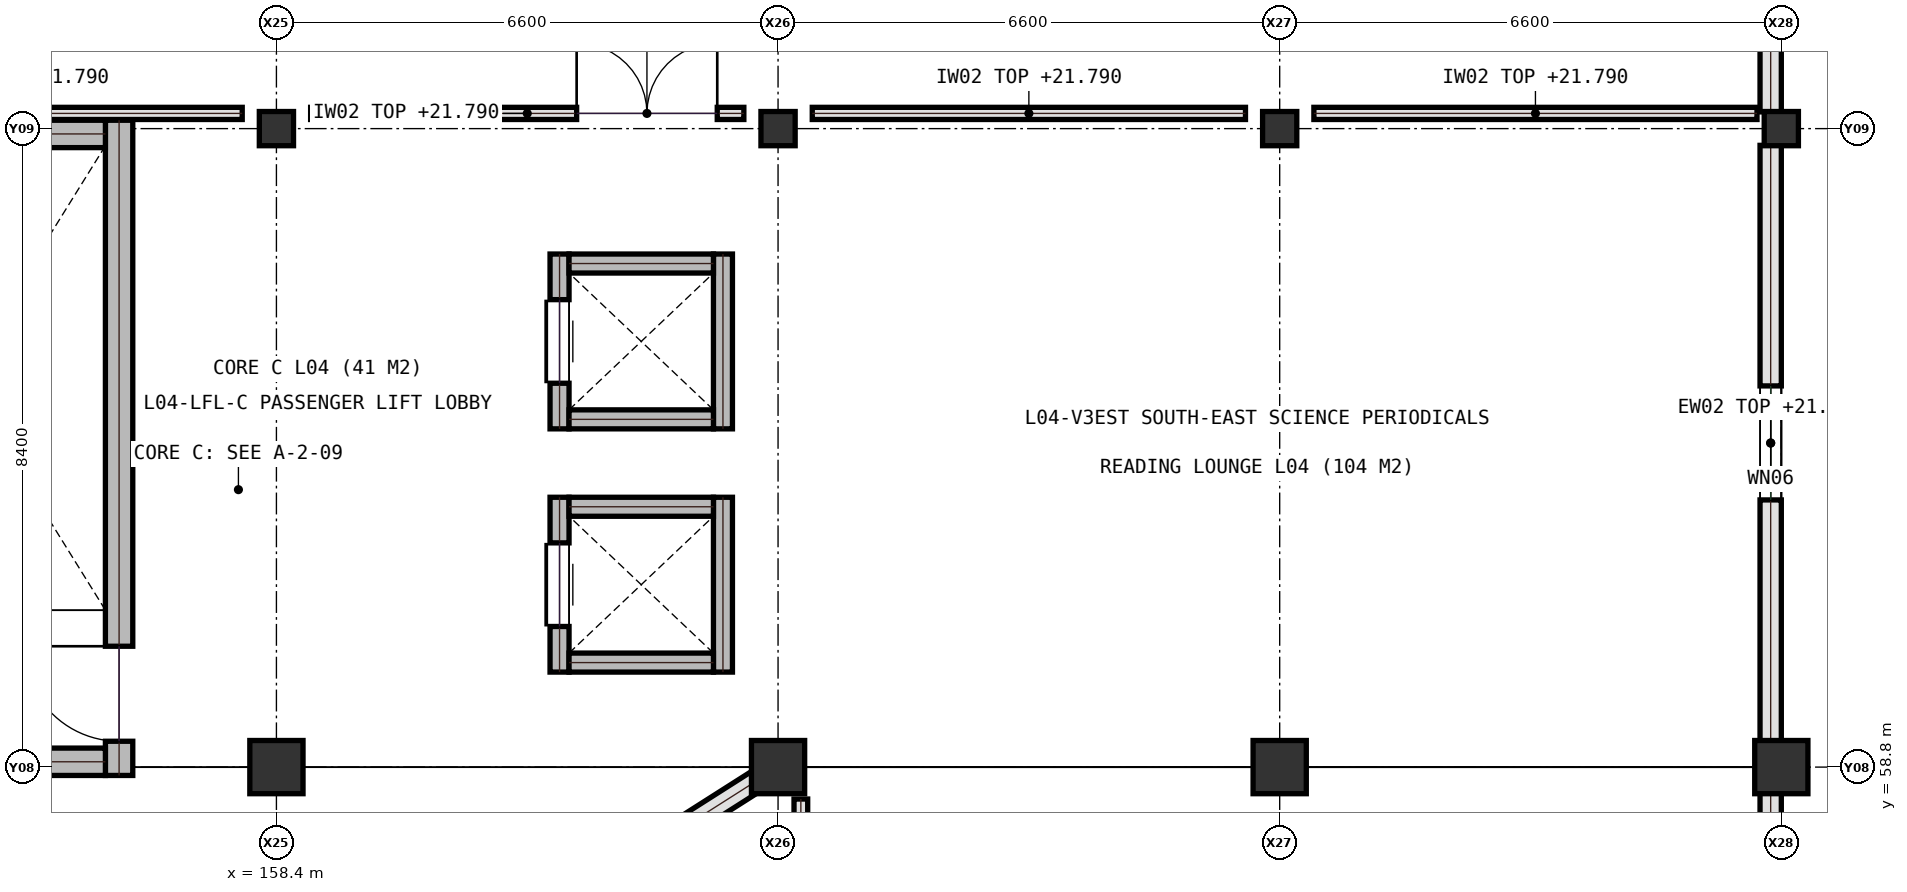
"""IFC4 building model, lengths in metres.
Left out: names, types, materials, properties, quantities, classifications, styles, units other than length and angle.
Written with IfcOpenShell. Run it as: python <this file> out.ifc"""

import sys

from ifc_helpers import new_model, si_unit, direction, frame, frame_2d, origin, origin_2d, place, context, subcontext, project, spatial, rectangle, extrude, element, fill, save


model = new_model("IFC4")
c1 = context("Model", 3, precision=1e-05, world=origin(), true_north=direction((0.0, 1.0)))
c2 = subcontext(c1, "Body", "Model", "MODEL_VIEW")
j1 = project(units=[si_unit("LENGTHUNIT", "METRE"), si_unit("PLANEANGLEUNIT", "RADIAN")], contexts=[c1])
p1 = place(None, origin())
s1 = spatial("IfcSite", under=j1, at=p1, CompositionType="ELEMENT")
p2 = place(p1, origin())
s2 = spatial("IfcBuilding", under=s1, at=p2, CompositionType="ELEMENT")
p3 = place(p2, frame((0.0, 0.0, 18.6)))
s3 = spatial("IfcBuildingStorey", under=s2, at=p3, CompositionType="ELEMENT", Elevation=18.6)
p4 = place(p3, frame((158.4, 58.8, 0.0), z_axis=(0.0, 0.0, 1.0), x_axis=(1.0, 0.0, 0.0)))
e1 = element("IfcColumn", 1, at=p4, inside=s3, PredefinedType="COLUMN", context=c2, shape_type="SweptSolid", body=[
    extrude(rectangle(XDim=0.7, YDim=0.7, at=origin_2d()), origin(), (0.0, 0.0, 1.0), 4.2),
])
p5 = place(p3, frame((158.4, 67.2, 0.0), z_axis=(0.0, 0.0, 1.0), x_axis=(1.0, 0.0, 0.0)))
e2 = element("IfcColumn", 2, at=p5, inside=s3, PredefinedType="COLUMN", context=c2, shape_type="SweptSolid", body=[
    extrude(rectangle(XDim=0.45, YDim=0.45, at=origin_2d()), origin(), (0.0, 0.0, 1.0), 5.495),
])
p6 = place(p3, frame((165.0, 58.8, 0.0), z_axis=(0.0, 0.0, 1.0), x_axis=(1.0, 0.0, 0.0)))
e3 = element("IfcColumn", 3, at=p6, inside=s3, PredefinedType="COLUMN", context=c2, shape_type="SweptSolid", body=[
    extrude(rectangle(XDim=0.7, YDim=0.7, at=origin_2d()), origin(), (0.0, 0.0, 1.0), 4.2),
])
p7 = place(p3, frame((165.0, 67.2, 0.0), z_axis=(0.0, 0.0, 1.0), x_axis=(1.0, 0.0, 0.0)))
e4 = element("IfcColumn", 4, at=p7, inside=s3, PredefinedType="COLUMN", context=c2, shape_type="SweptSolid", body=[
    extrude(rectangle(XDim=0.45, YDim=0.45, at=origin_2d()), origin(), (0.0, 0.0, 1.0), 4.01),
])
p8 = place(p3, frame((171.6, 58.8, 0.0), z_axis=(0.0, 0.0, 1.0), x_axis=(1.0, 0.0, 0.0)))
e5 = element("IfcColumn", 5, at=p8, inside=s3, PredefinedType="COLUMN", context=c2, shape_type="SweptSolid", body=[
    extrude(rectangle(XDim=0.7, YDim=0.7, at=origin_2d()), origin(), (0.0, 0.0, 1.0), 4.2),
])
p9 = place(p3, frame((171.6, 67.2, 0.0), z_axis=(0.0, 0.0, 1.0), x_axis=(1.0, 0.0, 0.0)))
e6 = element("IfcColumn", 6, at=p9, inside=s3, PredefinedType="COLUMN", context=c2, shape_type="SweptSolid", body=[
    extrude(rectangle(XDim=0.45, YDim=0.45, at=origin_2d()), origin(), (0.0, 0.0, 1.0), 5.66),
])
p10 = place(p3, frame((178.2, 58.8, 0.0), z_axis=(0.0, 0.0, 1.0), x_axis=(1.0, 0.0, 0.0)))
e7 = element("IfcColumn", 7, at=p10, inside=s3, PredefinedType="COLUMN", context=c2, shape_type="SweptSolid", body=[
    extrude(rectangle(XDim=0.7, YDim=0.7, at=origin_2d()), origin(), (0.0, 0.0, 1.0), 4.2),
])
p11 = place(p3, frame((178.2, 67.2, 0.0), z_axis=(0.0, 0.0, 1.0), x_axis=(1.0, 0.0, 0.0)))
e8 = element("IfcColumn", 8, at=p11, inside=s3, PredefinedType="COLUMN", context=c2, shape_type="SweptSolid", body=[
    extrude(rectangle(XDim=0.45, YDim=0.45, at=origin_2d()), origin(), (0.0, 0.0, 1.0), 7.31),
])
p12 = place(p3, frame((152.0, 67.4, 0.0), z_axis=(0.0, 0.0, 1.0), x_axis=(1.0, 0.0, 0.0)))
e9 = element("IfcWall", 9, at=p12, inside=s3, PredefinedType="PARTITIONING", context=c2, shape_type="SweptSolid", body=[
    extrude(rectangle(XDim=5.95, YDim=0.16, at=frame_2d((2.975, 0.0))), origin(), (0.0, 0.0, 1.0), 3.19),
])
p13 = place(p3, frame((158.85, 67.4, 0.0), z_axis=(0.0, 0.0, 1.0), x_axis=(1.0, 0.0, 0.0)))
e10 = element("IfcWall", 10, at=p13, inside=s3, PredefinedType="PARTITIONING", context=c2, shape_type="SweptSolid", body=[
    extrude(rectangle(XDim=5.7, YDim=0.16, at=frame_2d((2.85, 0.0))), origin(), (0.0, 0.0, 1.0), 3.19),
])
p14 = place(p13, frame((3.5, 0.0, 0.0)))
e11 = element("IfcOpeningElement", 11, at=p14, cuts=e10, PredefinedType="OPENING", context=c2, shape_type="SweptSolid", body=[
    extrude(rectangle(XDim=1.85, YDim=2.25, at=frame_2d((0.925, 1.125))), frame((0.0, 0.09, 0.0), z_axis=(0.0, -1.0, 0.0), x_axis=(1.0, 0.0, 0.0)), (0.0, 0.0, 1.0), 0.18),
])
p15 = place(p3, frame((165.45, 67.4, 0.0), z_axis=(0.0, 0.0, 1.0), x_axis=(1.0, 0.0, 0.0)))
e12 = element("IfcWall", 12, at=p15, inside=s3, PredefinedType="PARTITIONING", context=c2, shape_type="SweptSolid", body=[
    extrude(rectangle(XDim=5.7, YDim=0.16, at=frame_2d((2.85, 0.0))), origin(), (0.0, 0.0, 1.0), 3.19),
])
p16 = place(p3, frame((172.05, 67.4, 0.0), z_axis=(0.0, 0.0, 1.0), x_axis=(1.0, 0.0, 0.0)))
e13 = element("IfcWall", 13, at=p16, inside=s3, PredefinedType="PARTITIONING", context=c2, shape_type="SweptSolid", body=[
    extrude(rectangle(XDim=5.83, YDim=0.16, at=frame_2d((2.915, 0.0))), origin(), (0.0, 0.0, 1.0), 3.19),
])
p17 = place(p3, frame((165.3, 50.85, 0.0), z_axis=(0.0, 0.0, 1.0), x_axis=(0.0, 1.0, 0.0)))
e14 = element("IfcWall", 14, at=p17, inside=s3, PredefinedType="SOLIDWALL", context=c2, shape_type="SweptSolid", body=[
    extrude(rectangle(XDim=7.53, YDim=0.18, at=frame_2d((3.765, 0.0))), origin(), (0.0, 0.0, 1.0), 3.19),
])
p18 = place(p17, frame((4.4, 0.0, 0.0)))
e15 = element("IfcOpeningElement", 15, at=p18, cuts=e14, PredefinedType="OPENING", context=c2, shape_type="SweptSolid", body=[
    extrude(rectangle(XDim=1.6, YDim=2.2, at=frame_2d((0.8, 1.1))), frame((0.0, 0.1, 0.0), z_axis=(0.0, -1.0, 0.0), x_axis=(1.0, 0.0, 0.0)), (0.0, 0.0, 1.0), 0.2),
])
p19 = place(p3, frame((178.06, 50.745, 0.0), z_axis=(0.0, 0.0, 1.0), x_axis=(0.0, 1.0, 0.0)))
e16 = element("IfcWall", 16, at=p19, inside=s3, PredefinedType="SOLIDWALL", context=c2, shape_type="SweptSolid", body=[
    extrude(rectangle(XDim=7.71, YDim=0.28, at=frame_2d((3.855, 0.0))), origin(), (0.0, 0.0, 1.0), 3.325),
])
p20 = place(p19, frame((2.955, 0.0, 0.95)))
e17 = element("IfcOpeningElement", 17, at=p20, cuts=e16, PredefinedType="OPENING", context=c2, shape_type="SweptSolid", body=[
    extrude(rectangle(XDim=1.8, YDim=1.6, at=frame_2d((0.9, 0.8))), frame((0.0, 0.15, 0.0), z_axis=(0.0, -1.0, 0.0), x_axis=(1.0, 0.0, 0.0)), (0.0, 0.0, 1.0), 0.3),
])
p21 = place(p3, frame((178.06, 59.145, 0.0), z_axis=(0.0, 0.0, 1.0), x_axis=(0.0, 1.0, 0.0)))
e18 = element("IfcWall", 18, at=p21, inside=s3, PredefinedType="SOLIDWALL", context=c2, shape_type="SweptSolid", body=[
    extrude(rectangle(XDim=7.835, YDim=0.28, at=frame_2d((3.917, 0.0))), origin(), (0.0, 0.0, 1.0), 3.325),
])
p22 = place(p21, frame((3.17, 0.0, 0.95)))
e19 = element("IfcOpeningElement", 19, at=p22, cuts=e18, PredefinedType="OPENING", context=c2, shape_type="SweptSolid", body=[
    extrude(rectangle(XDim=1.5, YDim=2.1, at=frame_2d((0.75, 1.05))), frame((0.0, 0.15, 0.0), z_axis=(0.0, -1.0, 0.0), x_axis=(1.0, 0.0, 0.0)), (0.0, 0.0, 1.0), 0.3),
])
p23 = place(p3, frame((178.06, 67.42, 0.0), z_axis=(0.0, 0.0, 1.0), x_axis=(0.0, 1.0, 0.0)))
e20 = element("IfcWall", 20, at=p23, inside=s3, PredefinedType="SOLIDWALL", context=c2, shape_type="SweptSolid", body=[
    extrude(rectangle(XDim=7.96, YDim=0.28, at=frame_2d((3.98, 0.0))), origin(), (0.0, 0.0, 1.0), 3.94),
])
p24 = place(p23, frame((3.455, 0.0, 0.95)))
e21 = element("IfcOpeningElement", 21, at=p24, cuts=e20, PredefinedType="OPENING", context=c2, shape_type="SweptSolid", body=[
    extrude(rectangle(XDim=1.05, YDim=1.75, at=frame_2d((0.525, 0.875))), frame((0.0, 0.15, 0.0), z_axis=(0.0, -1.0, 0.0), x_axis=(1.0, 0.0, 0.0)), (0.0, 0.0, 1.0), 0.3),
])
p25 = place(p3, frame((158.65, 54.76, 0.0), z_axis=(0.0, 0.0, 1.0), x_axis=(0.843786613851, 0.536678814829, 0.0)))
e22 = element("IfcWall", 22, at=p25, inside=s3, PredefinedType="SOLIDWALL", context=c2, shape_type="SweptSolid", body=[
    extrude(rectangle(XDim=7.229, YDim=0.28, at=frame_2d((3.615, 0.0))), origin(), (0.0, 0.0, 1.0), 3.325),
])
p26 = place(p25, frame((2.415, 0.0, 0.95)))
e23 = element("IfcOpeningElement", 23, at=p26, cuts=e22, PredefinedType="OPENING", context=c2, shape_type="SweptSolid", body=[
    extrude(rectangle(XDim=2.4, YDim=1.6, at=frame_2d((1.2, 0.8))), frame((0.0, 0.15, 0.0), z_axis=(0.0, -1.0, 0.0), x_axis=(1.0, 0.0, 0.0)), (0.0, 0.0, 1.0), 0.3),
])
p27 = place(p3, frame((156.33, 58.69, 0.0), z_axis=(0.0, 0.0, 1.0), x_axis=(0.0, 1.0, 0.0)))
e24 = element("IfcWall", 24, at=p27, inside=s3, PredefinedType="SHEAR", context=c2, shape_type="SweptSolid", body=[
    extrude(rectangle(XDim=8.62, YDim=0.36, at=frame_2d((4.31, 0.0))), origin(), (0.0, 0.0, 1.0), 3.96),
])
p28 = place(p27, frame((0.45, 0.0, 0.0)))
e25 = element("IfcOpeningElement", 25, at=p28, cuts=e24, PredefinedType="OPENING", context=c2, shape_type="SweptSolid", body=[
    extrude(rectangle(XDim=1.25, YDim=2.15, at=frame_2d((0.625, 1.075))), frame((0.0, 0.19, 0.0), z_axis=(0.0, -1.0, 0.0), x_axis=(1.0, 0.0, 0.0)), (0.0, 0.0, 1.0), 0.38),
])
for number, where, z_axis, x_axis in (
    (26, (152.35, 67.13, 0.0), (0.0, 0.0, 1.0), (1.0, 0.0, 0.0)),
    (27, (152.35, 58.87, 0.0), (0.0, 0.0, 1.0), (1.0, 0.0, 0.0)),
):
    element("IfcWall", number, at=place(p3, frame(where, z_axis=z_axis, x_axis=x_axis)), inside=s3, PredefinedType="SHEAR", context=c2, shape_type="SweptSolid", body=[
        extrude(rectangle(XDim=3.8, YDim=0.36, at=frame_2d((1.9, 0.0))), origin(), (0.0, 0.0, 1.0), 3.96),
    ])
p29 = place(p3, frame((162.125, 60.05, 0.0), z_axis=(0.0, 0.0, 1.0), x_axis=(0.0, 1.0, 0.0)))
e28 = element("IfcWall", 28, at=p29, inside=s3, PredefinedType="SHEAR", context=c2, shape_type="SweptSolid", body=[
    extrude(rectangle(XDim=2.3, YDim=0.25, at=frame_2d((1.15, 0.0))), origin(), (0.0, 0.0, 1.0), 3.96),
])
p30 = place(p29, frame((0.6, 0.0, 0.0)))
e29 = element("IfcOpeningElement", 29, at=p30, cuts=e28, PredefinedType="OPENING", context=c2, shape_type="SweptSolid", body=[
    extrude(rectangle(XDim=1.1, YDim=2.15, at=frame_2d((0.55, 1.075))), frame((0.0, 0.135, 0.0), z_axis=(0.0, -1.0, 0.0), x_axis=(1.0, 0.0, 0.0)), (0.0, 0.0, 1.0), 0.27),
])
p31 = place(p3, frame((164.275, 60.05, 0.0), z_axis=(0.0, 0.0, 1.0), x_axis=(0.0, 1.0, 0.0)))
e30 = element("IfcWall", 30, at=p31, inside=s3, PredefinedType="SHEAR", context=c2, shape_type="SweptSolid", body=[
    extrude(rectangle(XDim=2.3, YDim=0.25, at=frame_2d((1.15, 0.0))), origin(), (0.0, 0.0, 1.0), 3.96),
])
for number, where, z_axis, x_axis in (
    (31, (162.25, 60.175, 0.0), (0.0, 0.0, 1.0), (1.0, 0.0, 0.0)),
    (32, (162.25, 62.225, 0.0), (0.0, 0.0, 1.0), (1.0, 0.0, 0.0)),
):
    element("IfcWall", number, at=place(p3, frame(where, z_axis=z_axis, x_axis=x_axis)), inside=s3, PredefinedType="SHEAR", context=c2, shape_type="SweptSolid", body=[
        extrude(rectangle(XDim=1.9, YDim=0.25, at=frame_2d((0.95, 0.0))), origin(), (0.0, 0.0, 1.0), 3.96),
    ])
p32 = place(p3, frame((162.125, 63.25, 0.0), z_axis=(0.0, 0.0, 1.0), x_axis=(0.0, 1.0, 0.0)))
e33 = element("IfcWall", 33, at=p32, inside=s3, PredefinedType="SHEAR", context=c2, shape_type="SweptSolid", body=[
    extrude(rectangle(XDim=2.3, YDim=0.25, at=frame_2d((1.15, 0.0))), origin(), (0.0, 0.0, 1.0), 3.96),
])
p33 = place(p32, frame((0.6, 0.0, 0.0)))
e34 = element("IfcOpeningElement", 34, at=p33, cuts=e33, PredefinedType="OPENING", context=c2, shape_type="SweptSolid", body=[
    extrude(rectangle(XDim=1.1, YDim=2.15, at=frame_2d((0.55, 1.075))), frame((0.0, 0.135, 0.0), z_axis=(0.0, -1.0, 0.0), x_axis=(1.0, 0.0, 0.0)), (0.0, 0.0, 1.0), 0.27),
])
p34 = place(p3, frame((164.275, 63.25, 0.0), z_axis=(0.0, 0.0, 1.0), x_axis=(0.0, 1.0, 0.0)))
e35 = element("IfcWall", 35, at=p34, inside=s3, PredefinedType="SHEAR", context=c2, shape_type="SweptSolid", body=[
    extrude(rectangle(XDim=2.3, YDim=0.25, at=frame_2d((1.15, 0.0))), origin(), (0.0, 0.0, 1.0), 3.96),
])
for number, where, z_axis, x_axis in (
    (36, (162.25, 63.375, 0.0), (0.0, 0.0, 1.0), (1.0, 0.0, 0.0)),
    (37, (162.25, 65.425, 0.0), (0.0, 0.0, 1.0), (1.0, 0.0, 0.0)),
):
    element("IfcWall", number, at=place(p3, frame(where, z_axis=z_axis, x_axis=x_axis)), inside=s3, PredefinedType="SHEAR", context=c2, shape_type="SweptSolid", body=[
        extrude(rectangle(XDim=1.9, YDim=0.25, at=frame_2d((0.95, 0.0))), origin(), (0.0, 0.0, 1.0), 3.96),
    ])
p35 = place(p14, origin())
e38 = element("IfcDoor", 38, at=p35, inside=s3, OperationType="DOUBLE_DOOR_SINGLE_SWING", PredefinedType="DOOR", context=c2, shape_type="SweptSolid", body=[
    extrude(rectangle(XDim=1.85, YDim=2.25, at=frame_2d((0.925, 1.125))), frame((0.0, 0.025, 0.0), z_axis=(0.0, -1.0, 0.0), x_axis=(1.0, 0.0, 0.0)), (0.0, 0.0, 1.0), 0.05),
])
fill(e11, e38)
p36 = place(p22, origin())
e39 = element("IfcWindow", 39, at=p36, inside=s3, PartitioningType="SINGLE_PANEL", PredefinedType="WINDOW", context=c2, shape_type="SweptSolid", body=[
    extrude(rectangle(XDim=1.5, YDim=2.1, at=frame_2d((0.75, 1.05))), frame((0.0, 0.03, 0.0), z_axis=(0.0, -1.0, 0.0), x_axis=(1.0, 0.0, 0.0)), (0.0, 0.0, 1.0), 0.06),
])
fill(e19, e39)
p37 = place(p28, origin())
e40 = element("IfcDoor", 40, at=p37, inside=s3, OperationType="SINGLE_SWING_RIGHT", PredefinedType="DOOR", context=c2, shape_type="SweptSolid", body=[
    extrude(rectangle(XDim=1.25, YDim=2.15, at=frame_2d((0.625, 1.075))), frame((0.0, 0.025, 0.0), z_axis=(0.0, -1.0, 0.0), x_axis=(1.0, 0.0, 0.0)), (0.0, 0.0, 1.0), 0.05),
])
fill(e25, e40)
p38 = place(p30, origin())
e41 = element("IfcDoor", 41, at=p38, inside=s3, OperationType="SLIDING_TO_LEFT", PredefinedType="DOOR", context=c2, shape_type="SweptSolid", body=[
    extrude(rectangle(XDim=1.1, YDim=2.15, at=frame_2d((0.55, 1.075))), frame((0.0, 0.025, 0.0), z_axis=(0.0, -1.0, 0.0), x_axis=(1.0, 0.0, 0.0)), (0.0, 0.0, 1.0), 0.05),
])
fill(e29, e41)
p39 = place(p33, origin())
e42 = element("IfcDoor", 42, at=p39, inside=s3, OperationType="SLIDING_TO_LEFT", PredefinedType="DOOR", context=c2, shape_type="SweptSolid", body=[
    extrude(rectangle(XDim=1.1, YDim=2.15, at=frame_2d((0.55, 1.075))), frame((0.0, 0.025, 0.0), z_axis=(0.0, -1.0, 0.0), x_axis=(1.0, 0.0, 0.0)), (0.0, 0.0, 1.0), 0.05),
])
fill(e34, e42)
save(model, sys.argv[1])
